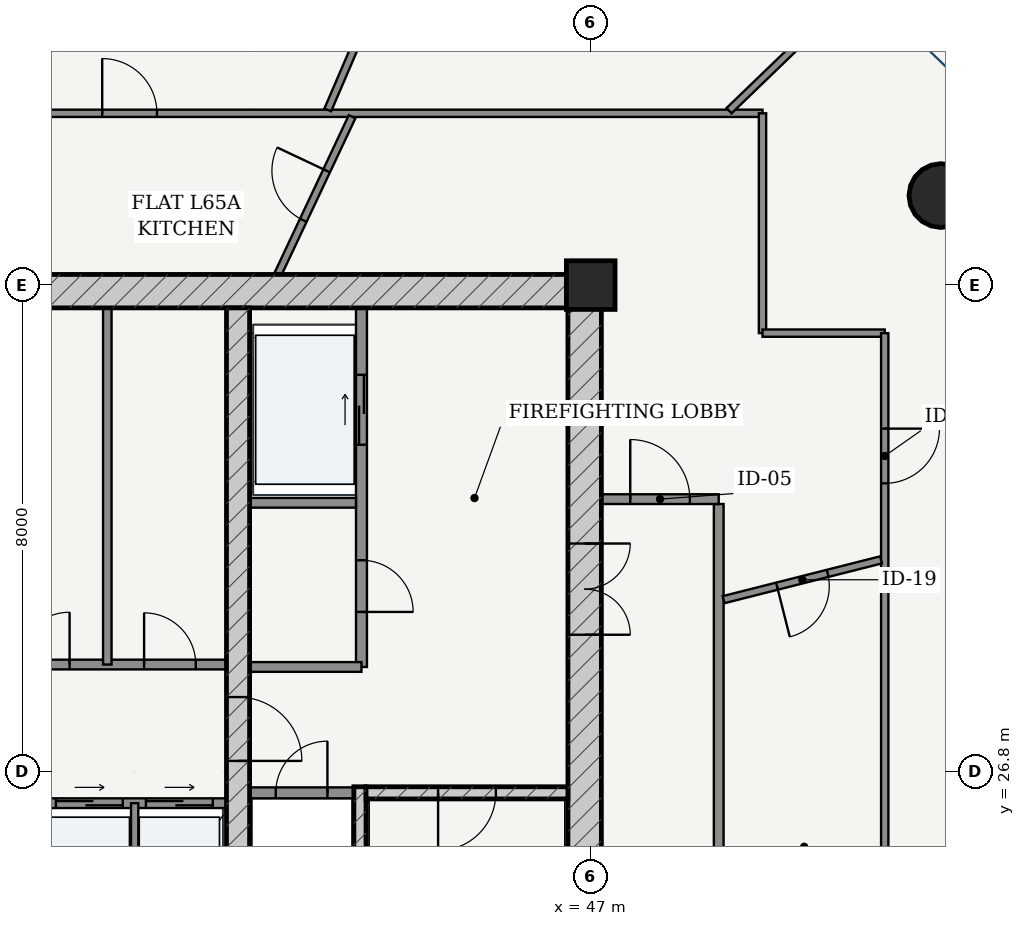
"""IFC4 building model, lengths in metres.
Left out: names, types, materials, properties, quantities, classifications, styles, units other than length and angle.
Written with IfcOpenShell. Run it as: python <this file> out.ifc"""

import sys

from ifc_helpers import new_model, si_unit, direction, frame, frame_2d, origin, origin_2d, place, context, subcontext, project, spatial, rectangle, hollow_circle, extrude, source, transform, mapped, element, fill, save


model = new_model("IFC4")
c1 = context("Model", 3, precision=1e-05, world=origin(), true_north=direction((-0.2419218956, 0.970295726276)))
c2 = subcontext(c1, "Body", "Model", "MODEL_VIEW")
j1 = project(units=[si_unit("LENGTHUNIT", "METRE"), si_unit("PLANEANGLEUNIT", "RADIAN")], contexts=[c1])
p1 = place(None, origin())
s1 = spatial("IfcSite", under=j1, at=p1, CompositionType="ELEMENT")
p2 = place(p1, origin())
s2 = spatial("IfcBuilding", under=s1, at=p2, CompositionType="ELEMENT")
p3 = place(p2, frame((0.0, 0.0, 248.2)))
s3 = spatial("IfcBuildingStorey", under=s2, at=p3, CompositionType="ELEMENT", Elevation=248.2)
p4 = place(p3, frame((47.0, 34.8, 0.0), z_axis=(0.0, 0.0, 1.0), x_axis=(1.0, 0.0, 0.0)))
e1 = element("IfcColumn", 1, at=p4, inside=s3, PredefinedType="COLUMN", context=c2, shape_type="SweptSolid", body=[
    extrude(rectangle(XDim=0.8, YDim=0.8, at=origin_2d()), origin(), (0.0, 0.0, 1.0), 3.75),
])
p5 = place(p3, frame((28.825, 34.7, 0.0), z_axis=(0.0, 0.0, 1.0), x_axis=(1.0, 0.0, 0.0)))
e2 = element("IfcWall", 2, at=p5, inside=s3, PredefinedType="SHEAR", context=c2, shape_type="SweptSolid", body=[
    extrude(rectangle(XDim=18.35, YDim=0.55, at=frame_2d((9.175, 0.0))), origin(), (0.0, 0.0, 1.0), 3.49),
])
p6 = place(p3, frame((46.9, 19.175, 0.0), z_axis=(0.0, 0.0, 1.0), x_axis=(0.0, 1.0, 0.0)))
e3 = element("IfcWall", 3, at=p6, inside=s3, PredefinedType="SHEAR", context=c2, shape_type="SweptSolid", body=[
    extrude(rectangle(XDim=15.25, YDim=0.55, at=frame_2d((7.625, 0.0))), origin(), (0.0, 0.0, 1.0), 3.49),
])
p7 = place(p6, frame((9.875, 0.0, 0.0)))
e4 = element("IfcOpeningElement", 4, at=p7, cuts=e3, PredefinedType="OPENING", context=c2, shape_type="SweptSolid", body=[
    extrude(rectangle(XDim=1.5, YDim=2.2, at=frame_2d((0.75, 1.1))), frame((0.0, 0.285, 0.0), z_axis=(0.0, -1.0, 0.0), x_axis=(1.0, 0.0, 0.0)), (0.0, 0.0, 1.0), 0.57),
])
p8 = place(p3, frame((43.205, 19.175, 0.0), z_axis=(0.0, 0.0, 1.0), x_axis=(0.0, 1.0, 0.0)))
e5 = element("IfcWall", 5, at=p8, inside=s3, PredefinedType="SOLIDWALL", context=c2, shape_type="SweptSolid", body=[
    extrude(rectangle(XDim=7.375, YDim=0.2, at=frame_2d((3.688, 0.0))), origin(), (0.0, 0.0, 1.0), 3.49),
])
p9 = place(p3, frame((43.305, 26.45, 0.0), z_axis=(0.0, 0.0, 1.0), x_axis=(1.0, 0.0, 0.0)))
e6 = element("IfcWall", 6, at=p9, inside=s3, PredefinedType="SOLIDWALL", context=c2, shape_type="SweptSolid", body=[
    extrude(rectangle(XDim=3.32, YDim=0.2, at=frame_2d((1.66, 0.0))), origin(), (0.0, 0.0, 1.0), 3.49),
])
p10 = place(p9, frame((1.185, 0.0, 0.0)))
e7 = element("IfcOpeningElement", 7, at=p10, cuts=e6, PredefinedType="OPENING", context=c2, shape_type="SweptSolid", body=[
    extrude(rectangle(XDim=0.95, YDim=2.15, at=frame_2d((0.475, 1.075))), frame((0.0, 0.11, 0.0), z_axis=(0.0, -1.0, 0.0), x_axis=(1.0, 0.0, 0.0)), (0.0, 0.0, 1.0), 0.22),
])
p11 = place(p3, frame((41.2, 19.175, 0.0), z_axis=(0.0, 0.0, 1.0), x_axis=(0.0, 1.0, 0.0)))
e8 = element("IfcWall", 8, at=p11, inside=s3, PredefinedType="SHEAR", context=c2, shape_type="SweptSolid", body=[
    extrude(rectangle(XDim=15.25, YDim=0.38, at=frame_2d((7.625, 0.0))), origin(), (0.0, 0.0, 1.0), 3.49),
])
p12 = place(p11, frame((7.8, 0.0, 0.0)))
e9 = element("IfcOpeningElement", 9, at=p12, cuts=e8, PredefinedType="OPENING", context=c2, shape_type="SweptSolid", body=[
    extrude(rectangle(XDim=1.05, YDim=2.15, at=frame_2d((0.525, 1.075))), frame((0.0, 0.2, 0.0), z_axis=(0.0, -1.0, 0.0), x_axis=(1.0, 0.0, 0.0)), (0.0, 0.0, 1.0), 0.4),
])
p13 = place(p3, frame((52.759, 36.272, 0.0), z_axis=(0.0, 0.0, 1.0), x_axis=(1.0, 0.0, 0.0)))
e10 = element("IfcColumn", 10, at=p13, inside=s3, PredefinedType="COLUMN", context=c2, shape_type="SweptSolid", body=[
    extrude(hollow_circle(Radius=0.525, WallThickness=0.035, at=origin_2d()), origin(), (0.0, 0.0, 1.0), 3.75),
])
p14 = place(p3, frame((41.39, 26.45, 0.0), z_axis=(0.0, 0.0, 1.0), x_axis=(1.0, 0.0, 0.0)))
e11 = element("IfcWall", 11, at=p14, inside=s3, PredefinedType="PARTITIONING", context=c2, shape_type="SweptSolid", body=[
    extrude(rectangle(XDim=1.71, YDim=0.18, at=frame_2d((0.855, 0.0))), origin(), (0.0, 0.0, 1.0), 3.49),
])
p15 = place(p14, frame((0.43, 0.0, 0.0)))
e12 = element("IfcOpeningElement", 12, at=p15, cuts=e11, PredefinedType="OPENING", context=c2, shape_type="SweptSolid", body=[
    extrude(rectangle(XDim=0.85, YDim=2.1, at=frame_2d((0.425, 1.05))), frame((0.0, 0.1, 0.0), z_axis=(0.0, -1.0, 0.0), x_axis=(1.0, 0.0, 0.0)), (0.0, 0.0, 1.0), 0.2),
])
p16 = place(p3, frame((43.23, 28.52, 0.0), z_axis=(0.0, 0.0, 1.0), x_axis=(0.0, 1.0, 0.0)))
e13 = element("IfcWall", 13, at=p16, inside=s3, PredefinedType="PARTITIONING", context=c2, shape_type="SweptSolid", body=[
    extrude(rectangle(XDim=5.905, YDim=0.18, at=frame_2d((2.953, 0.0))), origin(), (0.0, 0.0, 1.0), 3.49),
])
p17 = place(p16, frame((0.905, 0.0, 0.0)))
e14 = element("IfcOpeningElement", 14, at=p17, cuts=e13, PredefinedType="OPENING", context=c2, shape_type="SweptSolid", body=[
    extrude(rectangle(XDim=0.85, YDim=2.1, at=frame_2d((0.425, 1.05))), frame((0.0, 0.1, 0.0), z_axis=(0.0, -1.0, 0.0), x_axis=(1.0, 0.0, 0.0)), (0.0, 0.0, 1.0), 0.2),
])
p18 = place(p16, frame((3.655, 0.0, 0.0)))
e15 = element("IfcOpeningElement", 15, at=p18, cuts=e13, PredefinedType="OPENING", context=c2, shape_type="SweptSolid", body=[
    extrude(rectangle(XDim=1.15, YDim=2.2, at=frame_2d((0.575, 1.1))), frame((0.0, 0.1, 0.0), z_axis=(0.0, -1.0, 0.0), x_axis=(1.0, 0.0, 0.0)), (0.0, 0.0, 1.0), 0.2),
])
p19 = place(p3, frame((41.39, 31.22, 0.0), z_axis=(0.0, 0.0, 1.0), x_axis=(1.0, 0.0, 0.0)))
e16 = element("IfcWall", 16, at=p19, inside=s3, PredefinedType="PARTITIONING", context=c2, shape_type="SweptSolid", body=[
    extrude(rectangle(XDim=1.75, YDim=0.16, at=frame_2d((0.875, 0.0))), origin(), (0.0, 0.0, 1.0), 3.49),
])
p20 = place(p3, frame((41.39, 28.52, 0.0), z_axis=(0.0, 0.0, 1.0), x_axis=(1.0, 0.0, 0.0)))
e17 = element("IfcWall", 17, at=p20, inside=s3, PredefinedType="PARTITIONING", context=c2, shape_type="SweptSolid", body=[
    extrude(rectangle(XDim=1.84, YDim=0.16, at=frame_2d((0.92, 0.0))), origin(), (0.0, 0.0, 1.0), 3.49),
])
p21 = place(p3, frame((34.99, 28.56, 0.0), z_axis=(0.0, 0.0, 1.0), x_axis=(1.0, 0.0, 0.0)))
e18 = element("IfcWall", 18, at=p21, inside=s3, PredefinedType="PARTITIONING", context=c2, shape_type="SweptSolid", body=[
    extrude(rectangle(XDim=6.02, YDim=0.16, at=frame_2d((3.01, 0.0))), origin(), (0.0, 0.0, 1.0), 3.49),
])
p22 = place(p21, frame((0.505, 0.0, 0.0)))
e19 = element("IfcOpeningElement", 19, at=p22, cuts=e18, PredefinedType="OPENING", context=c2, shape_type="SweptSolid", body=[
    extrude(rectangle(XDim=0.85, YDim=2.1, at=frame_2d((0.425, 1.05))), frame((0.0, 0.09, 0.0), z_axis=(0.0, -1.0, 0.0), x_axis=(1.0, 0.0, 0.0)), (0.0, 0.0, 1.0), 0.18),
])
p23 = place(p21, frame((2.58, 0.0, 0.0)))
e20 = element("IfcOpeningElement", 20, at=p23, cuts=e18, PredefinedType="OPENING", context=c2, shape_type="SweptSolid", body=[
    extrude(rectangle(XDim=0.86, YDim=2.1, at=frame_2d((0.43, 1.05))), frame((0.0, 0.09, 0.0), z_axis=(0.0, -1.0, 0.0), x_axis=(1.0, 0.0, 0.0)), (0.0, 0.0, 1.0), 0.18),
])
p24 = place(p21, frame((4.665, 0.0, 0.0)))
e21 = element("IfcOpeningElement", 21, at=p24, cuts=e18, PredefinedType="OPENING", context=c2, shape_type="SweptSolid", body=[
    extrude(rectangle(XDim=0.85, YDim=2.1, at=frame_2d((0.425, 1.05))), frame((0.0, 0.09, 0.0), z_axis=(0.0, -1.0, 0.0), x_axis=(1.0, 0.0, 0.0)), (0.0, 0.0, 1.0), 0.18),
])
p25 = place(p3, frame((39.05, 28.56, 0.0), z_axis=(0.0, 0.0, 1.0), x_axis=(0.0, 1.0, 0.0)))
e22 = element("IfcWall", 22, at=p25, inside=s3, PredefinedType="PARTITIONING", context=c2, shape_type="SweptSolid", body=[
    extrude(rectangle(XDim=5.865, YDim=0.14, at=frame_2d((2.933, 0.0))), origin(), (0.0, 0.0, 1.0), 3.49),
])
p26 = place(p3, frame((34.99, 26.28, 0.0), z_axis=(0.0, 0.0, 1.0), x_axis=(1.0, 0.0, 0.0)))
e23 = element("IfcWall", 23, at=p26, inside=s3, PredefinedType="PARTITIONING", context=c2, shape_type="SweptSolid", body=[
    extrude(rectangle(XDim=6.02, YDim=0.16, at=frame_2d((3.01, 0.0))), origin(), (0.0, 0.0, 1.0), 3.49),
])
p27 = place(p26, frame((3.215, 0.0, 0.0)))
e24 = element("IfcOpeningElement", 24, at=p27, cuts=e23, PredefinedType="OPENING", context=c2, shape_type="SweptSolid", body=[
    extrude(rectangle(XDim=1.1, YDim=2.2, at=frame_2d((0.55, 1.1))), frame((0.0, 0.09, 0.0), z_axis=(0.0, -1.0, 0.0), x_axis=(1.0, 0.0, 0.0)), (0.0, 0.0, 1.0), 0.18),
])
p28 = place(p26, frame((4.695, 0.0, 0.0)))
e25 = element("IfcOpeningElement", 25, at=p28, cuts=e23, PredefinedType="OPENING", context=c2, shape_type="SweptSolid", body=[
    extrude(rectangle(XDim=1.1, YDim=2.2, at=frame_2d((0.55, 1.1))), frame((0.0, 0.09, 0.0), z_axis=(0.0, -1.0, 0.0), x_axis=(1.0, 0.0, 0.0)), (0.0, 0.0, 1.0), 0.18),
])
p29 = place(p3, frame((39.5, 23.72, 0.0), z_axis=(0.0, 0.0, 1.0), x_axis=(0.0, 1.0, 0.0)))
e26 = element("IfcWall", 26, at=p29, inside=s3, PredefinedType="PARTITIONING", context=c2, shape_type="SweptSolid", body=[
    extrude(rectangle(XDim=2.56, YDim=0.12, at=frame_2d((1.28, 0.0))), origin(), (0.0, 0.0, 1.0), 3.49),
])
p30 = place(p3, frame((49.105, 17.275, 0.0), z_axis=(0.0, 0.0, 1.0), x_axis=(0.0, 1.0, 0.0)))
e27 = element("IfcWall", 27, at=p30, inside=s3, PredefinedType="PARTITIONING", context=c2, shape_type="SweptSolid", body=[
    extrude(rectangle(XDim=13.925, YDim=0.16, at=frame_2d((6.962, 0.0))), origin(), (0.0, 0.0, 1.0), 3.015),
])
p31 = place(p3, frame((47.175, 31.28, 0.0), z_axis=(0.0, 0.0, 1.0), x_axis=(1.0, 0.0, 0.0)))
e28 = element("IfcWall", 28, at=p31, inside=s3, PredefinedType="PARTITIONING", context=c2, shape_type="SweptSolid", body=[
    extrude(rectangle(XDim=1.93, YDim=0.16, at=frame_2d((0.965, 0.0))), origin(), (0.0, 0.0, 1.0), 3.49),
])
p32 = place(p31, frame((0.475, 0.0, 0.0)))
e29 = element("IfcOpeningElement", 29, at=p32, cuts=e28, PredefinedType="OPENING", context=c2, shape_type="SweptSolid", body=[
    extrude(rectangle(XDim=0.98, YDim=2.2, at=frame_2d((0.49, 1.1))), frame((0.0, 0.09, 0.0), z_axis=(0.0, -1.0, 0.0), x_axis=(1.0, 0.0, 0.0)), (0.0, 0.0, 1.0), 0.18),
])
p33 = place(p3, frame((26.175, 37.625, 0.0), z_axis=(0.0, 0.0, 1.0), x_axis=(1.0, 0.0, 0.0)))
e30 = element("IfcWall", 30, at=p33, inside=s3, PredefinedType="PARTITIONING", context=c2, shape_type="SweptSolid", body=[
    extrude(rectangle(XDim=23.65, YDim=0.12, at=frame_2d((11.825, 0.0))), origin(), (0.0, 0.0, 1.0), 3.015),
])
p34 = place(p33, frame((12.791, 0.0, 0.0)))
e31 = element("IfcOpeningElement", 31, at=p34, cuts=e30, PredefinedType="OPENING", context=c2, shape_type="SweptSolid", body=[
    extrude(rectangle(XDim=0.9, YDim=2.15, at=frame_2d((0.45, 1.075))), frame((0.0, 0.07, 0.0), z_axis=(0.0, -1.0, 0.0), x_axis=(1.0, 0.0, 0.0)), (0.0, 0.0, 1.0), 0.14),
])
p35 = place(p33, frame((6.48, 0.0, 0.0)))
e32 = element("IfcOpeningElement", 32, at=p35, cuts=e30, PredefinedType="OPENING", context=c2, shape_type="SweptSolid", body=[
    extrude(rectangle(XDim=0.9, YDim=2.15, at=frame_2d((0.45, 1.075))), frame((0.0, 0.07, 0.0), z_axis=(0.0, -1.0, 0.0), x_axis=(1.0, 0.0, 0.0)), (0.0, 0.0, 1.0), 0.14),
])
p36 = place(p33, frame((1.831, 0.0, 0.0)))
e33 = element("IfcOpeningElement", 33, at=p36, cuts=e30, PredefinedType="OPENING", context=c2, shape_type="SweptSolid", body=[
    extrude(rectangle(XDim=0.9, YDim=2.15, at=frame_2d((0.45, 1.075))), frame((0.0, 0.07, 0.0), z_axis=(0.0, -1.0, 0.0), x_axis=(1.0, 0.0, 0.0)), (0.0, 0.0, 1.0), 0.14),
])
p37 = place(p3, frame((49.825, 37.625, 0.0), z_axis=(0.0, 0.0, 1.0), x_axis=(0.0, -1.0, 0.0)))
e34 = element("IfcWall", 34, at=p37, inside=s3, PredefinedType="PARTITIONING", context=c2, shape_type="SweptSolid", body=[
    extrude(rectangle(XDim=3.615, YDim=0.12, at=frame_2d((1.808, 0.0))), origin(), (0.0, 0.0, 1.0), 3.015),
])
p38 = place(p3, frame((49.825, 34.01, 0.0), z_axis=(0.0, 0.0, 1.0), x_axis=(1.0, 0.0, 0.0)))
e35 = element("IfcWall", 35, at=p38, inside=s3, PredefinedType="PARTITIONING", context=c2, shape_type="SweptSolid", body=[
    extrude(rectangle(XDim=2.01, YDim=0.12, at=frame_2d((1.005, 0.0))), origin(), (0.0, 0.0, 1.0), 3.209),
])
p39 = place(p3, frame((51.835, 34.01, 0.0), z_axis=(0.0, 0.0, 1.0), x_axis=(0.0, -1.0, 0.0)))
e36 = element("IfcWall", 36, at=p39, inside=s3, PredefinedType="PARTITIONING", context=c2, shape_type="SweptSolid", body=[
    extrude(rectangle(XDim=12.632, YDim=0.12, at=frame_2d((6.316, 0.0))), origin(), (0.0, 0.0, 1.0), 3.015),
])
p40 = place(p39, frame((1.57, 0.0, 0.0)))
e37 = element("IfcOpeningElement", 37, at=p40, cuts=e36, PredefinedType="OPENING", context=c2, shape_type="SweptSolid", body=[
    extrude(rectangle(XDim=0.9, YDim=2.15, at=frame_2d((0.45, 1.075))), frame((0.0, 0.07, 0.0), z_axis=(0.0, -1.0, 0.0), x_axis=(1.0, 0.0, 0.0)), (0.0, 0.0, 1.0), 0.14),
])
p41 = place(p3, frame((49.275, 37.668, 0.0), z_axis=(0.0, 0.0, 1.0), x_axis=(0.719954096891, 0.694021684366, 0.0)))
e38 = element("IfcWall", 38, at=p41, inside=s3, PredefinedType="PARTITIONING", context=c2, shape_type="SweptSolid", body=[
    extrude(rectangle(XDim=3.333, YDim=0.12, at=frame_2d((1.667, 0.0))), origin(), (0.0, 0.0, 1.0), 3.121),
])
p42 = place(p3, frame((42.676, 37.682, 0.0), z_axis=(0.0, 0.0, 1.0), x_axis=(0.394777489933, 0.918776759307, 0.0)))
e39 = element("IfcWall", 39, at=p42, inside=s3, PredefinedType="PARTITIONING", context=c2, shape_type="SweptSolid", body=[
    extrude(rectangle(XDim=6.9, YDim=0.12, at=frame_2d((3.45, 0.0))), origin(), (0.0, 0.0, 1.0), 3.121),
])
p43 = place(p42, frame((3.0, 0.0, 0.0)))
e40 = element("IfcOpeningElement", 40, at=p43, cuts=e39, PredefinedType="OPENING", context=c2, shape_type="SweptSolid", body=[
    extrude(rectangle(XDim=0.9, YDim=2.15, at=frame_2d((0.45, 1.075))), frame((0.0, 0.07, 0.0), z_axis=(0.0, -1.0, 0.0), x_axis=(1.0, 0.0, 0.0)), (0.0, 0.0, 1.0), 0.14),
])
p44 = place(p3, frame((49.185, 29.627, 0.0), z_axis=(0.0, 0.0, 1.0), x_axis=(0.969515658159, 0.2450293627, 0.0)))
e41 = element("IfcWall", 41, at=p44, inside=s3, PredefinedType="PARTITIONING", context=c2, shape_type="SweptSolid", body=[
    extrude(rectangle(XDim=2.671, YDim=0.12, at=frame_2d((1.336, 0.0))), origin(), (0.0, 0.0, 1.0), 3.209),
])
p45 = place(p44, frame((0.906, 0.0, 0.0)))
e42 = element("IfcOpeningElement", 42, at=p45, cuts=e41, PredefinedType="OPENING", context=c2, shape_type="SweptSolid", body=[
    extrude(rectangle(XDim=0.86, YDim=2.15, at=frame_2d((0.43, 1.075))), frame((0.0, 0.07, 0.0), z_axis=(0.0, -1.0, 0.0), x_axis=(1.0, 0.0, 0.0)), (0.0, 0.0, 1.0), 0.14),
])
p46 = place(p3, frame((41.854, 34.977, 0.0), z_axis=(0.0, 0.0, 1.0), x_axis=(0.42640827804, 0.904530806783, 0.0)))
e43 = element("IfcWall", 43, at=p46, inside=s3, PredefinedType="PARTITIONING", context=c2, shape_type="SweptSolid", body=[
    extrude(rectangle(XDim=2.866, YDim=0.12, at=frame_2d((1.433, 0.0))), origin(), (0.0, 0.0, 1.0), 3.49),
])
p47 = place(p46, frame((0.983, 0.0, 0.0)))
e44 = element("IfcOpeningElement", 44, at=p47, cuts=e43, PredefinedType="OPENING", context=c2, shape_type="SweptSolid", body=[
    extrude(rectangle(XDim=0.9, YDim=2.15, at=frame_2d((0.45, 1.075))), frame((0.0, 0.07, 0.0), z_axis=(0.0, -1.0, 0.0), x_axis=(1.0, 0.0, 0.0)), (0.0, 0.0, 1.0), 0.14),
])
m1 = source(origin(), c2, "Body", "SweptSolid", [
    extrude(rectangle(XDim=1.5, YDim=2.2, at=frame_2d((0.75, 1.1))), frame((0.0, 0.025, 0.0), z_axis=(0.0, -1.0, 0.0), x_axis=(1.0, 0.0, 0.0)), (0.0, 0.0, 1.0), 0.05),
])
p48 = place(p7, frame((1.5, 0.0, 0.0), z_axis=(0.0, 0.0, 1.0), x_axis=(-1.0, 0.0, 0.0)))
e45 = element("IfcDoor", 45, at=p48, inside=s3, OperationType="DOUBLE_DOOR_SINGLE_SWING", PredefinedType="DOOR", context=c2, shape_type="MappedRepresentation", body=[
    mapped(m1, transform((0.0, 0.0, 0.0), scale=1.0)),
])
fill(e4, e45)
m2 = source(origin(), c2, "Body", "SweptSolid", [
    extrude(rectangle(XDim=1.05, YDim=2.15, at=frame_2d((0.525, 1.075))), frame((0.0, 0.025, 0.0), z_axis=(0.0, -1.0, 0.0), x_axis=(1.0, 0.0, 0.0)), (0.0, 0.0, 1.0), 0.05),
])
p49 = place(p12, frame((1.05, 0.0, 0.0), z_axis=(0.0, 0.0, 1.0), x_axis=(-1.0, 0.0, 0.0)))
e46 = element("IfcDoor", 46, at=p49, inside=s3, OperationType="SINGLE_SWING_RIGHT", PredefinedType="DOOR", context=c2, shape_type="MappedRepresentation", body=[
    mapped(m2, transform((0.0, 0.0, 0.0), scale=1.0)),
])
fill(e9, e46)
m3 = source(origin(), c2, "Body", "SweptSolid", [
    extrude(rectangle(XDim=0.95, YDim=2.15, at=frame_2d((0.475, 1.075))), frame((0.0, 0.025, 0.0), z_axis=(0.0, -1.0, 0.0), x_axis=(1.0, 0.0, 0.0)), (0.0, 0.0, 1.0), 0.05),
])
p50 = place(p10, frame((0.95, 0.0, 0.0), z_axis=(0.0, 0.0, 1.0), x_axis=(-1.0, 0.0, 0.0)))
e47 = element("IfcDoor", 47, at=p50, inside=s3, OperationType="SINGLE_SWING_RIGHT", PredefinedType="DOOR", context=c2, shape_type="MappedRepresentation", body=[
    mapped(m3, transform((0.0, 0.0, 0.0), scale=1.0)),
])
fill(e7, e47)
m4 = source(origin(), c2, "Body", "SweptSolid", [
    extrude(rectangle(XDim=0.85, YDim=2.1, at=frame_2d((0.425, 1.05))), frame((0.0, 0.025, 0.0), z_axis=(0.0, -1.0, 0.0), x_axis=(1.0, 0.0, 0.0)), (0.0, 0.0, 1.0), 0.05),
])
p51 = place(p15, origin())
e48 = element("IfcDoor", 48, at=p51, inside=s3, OperationType="SINGLE_SWING_RIGHT", PredefinedType="DOOR", context=c2, shape_type="MappedRepresentation", body=[
    mapped(m4, transform((0.0, 0.0, 0.0), scale=1.0)),
])
fill(e12, e48)
p52 = place(p17, frame((0.85, 0.0, 0.0), z_axis=(0.0, 0.0, 1.0), x_axis=(-1.0, 0.0, 0.0)))
e49 = element("IfcDoor", 49, at=p52, inside=s3, OperationType="SINGLE_SWING_RIGHT", PredefinedType="DOOR", context=c2, shape_type="MappedRepresentation", body=[
    mapped(m4, transform((0.0, 0.0, 0.0), scale=1.0)),
])
fill(e14, e49)
m5 = source(origin(), c2, "Body", "SweptSolid", [
    extrude(rectangle(XDim=0.86, YDim=2.1, at=frame_2d((0.43, 1.05))), frame((0.0, 0.025, 0.0), z_axis=(0.0, -1.0, 0.0), x_axis=(1.0, 0.0, 0.0)), (0.0, 0.0, 1.0), 0.05),
])
p53 = place(p23, origin())
e50 = element("IfcDoor", 50, at=p53, inside=s3, OperationType="SINGLE_SWING_RIGHT", PredefinedType="DOOR", context=c2, shape_type="MappedRepresentation", body=[
    mapped(m5, transform((0.0, 0.0, 0.0), scale=1.0)),
])
fill(e20, e50)
p54 = place(p24, origin())
e51 = element("IfcDoor", 51, at=p54, inside=s3, OperationType="SINGLE_SWING_LEFT", PredefinedType="DOOR", context=c2, shape_type="MappedRepresentation", body=[
    mapped(m4, transform((0.0, 0.0, 0.0), scale=1.0)),
])
fill(e21, e51)
m6 = source(origin(), c2, "Body", "SweptSolid", [
    extrude(rectangle(XDim=1.15, YDim=2.2, at=frame_2d((0.575, 1.1))), frame((0.0, 0.025, 0.0), z_axis=(0.0, -1.0, 0.0), x_axis=(1.0, 0.0, 0.0)), (0.0, 0.0, 1.0), 0.05),
])
p55 = place(p18, origin())
e52 = element("IfcDoor", 52, at=p55, inside=s3, OperationType="DOUBLE_DOOR_SLIDING", PredefinedType="DOOR", context=c2, shape_type="MappedRepresentation", body=[
    mapped(m6, transform((0.0, 0.0, 0.0), scale=1.0)),
])
fill(e15, e52)
m7 = source(origin(), c2, "Body", "SweptSolid", [
    extrude(rectangle(XDim=1.1, YDim=2.2, at=frame_2d((0.55, 1.1))), frame((0.0, 0.025, 0.0), z_axis=(0.0, -1.0, 0.0), x_axis=(1.0, 0.0, 0.0)), (0.0, 0.0, 1.0), 0.05),
])
p56 = place(p27, origin())
e53 = element("IfcDoor", 53, at=p56, inside=s3, OperationType="DOUBLE_DOOR_SLIDING", PredefinedType="DOOR", context=c2, shape_type="MappedRepresentation", body=[
    mapped(m7, transform((0.0, 0.0, 0.0), scale=1.0)),
])
fill(e24, e53)
p57 = place(p28, origin())
e54 = element("IfcDoor", 54, at=p57, inside=s3, OperationType="DOUBLE_DOOR_SLIDING", PredefinedType="DOOR", context=c2, shape_type="MappedRepresentation", body=[
    mapped(m7, transform((0.0, 0.0, 0.0), scale=1.0)),
])
fill(e25, e54)
m8 = source(origin(), c2, "Body", "SweptSolid", [
    extrude(rectangle(XDim=0.98, YDim=2.2, at=frame_2d((0.49, 1.1))), frame((0.0, 0.025, 0.0), z_axis=(0.0, -1.0, 0.0), x_axis=(1.0, 0.0, 0.0)), (0.0, 0.0, 1.0), 0.05),
])
p58 = place(p32, origin())
e55 = element("IfcDoor", 55, at=p58, inside=s3, OperationType="SINGLE_SWING_LEFT", PredefinedType="DOOR", context=c2, shape_type="MappedRepresentation", body=[
    mapped(m8, transform((0.0, 0.0, 0.0), scale=1.0)),
])
fill(e29, e55)
m9 = source(origin(), c2, "Body", "SweptSolid", [
    extrude(rectangle(XDim=0.86, YDim=2.15, at=frame_2d((0.43, 1.075))), frame((0.0, 0.025, 0.0), z_axis=(0.0, -1.0, 0.0), x_axis=(1.0, 0.0, 0.0)), (0.0, 0.0, 1.0), 0.05),
])
p59 = place(p45, frame((0.86, 0.0, 0.0), z_axis=(0.0, 0.0, 1.0), x_axis=(-1.0, 0.0, 0.0)))
e56 = element("IfcDoor", 56, at=p59, inside=s3, OperationType="SINGLE_SWING_RIGHT", PredefinedType="DOOR", context=c2, shape_type="MappedRepresentation", body=[
    mapped(m9, transform((0.0, 0.0, 0.0), scale=1.0)),
])
fill(e42, e56)
m10 = source(origin(), c2, "Body", "SweptSolid", [
    extrude(rectangle(XDim=0.9, YDim=2.15, at=frame_2d((0.45, 1.075))), frame((0.0, 0.025, 0.0), z_axis=(0.0, -1.0, 0.0), x_axis=(1.0, 0.0, 0.0)), (0.0, 0.0, 1.0), 0.05),
])
p60 = place(p40, origin())
e57 = element("IfcDoor", 57, at=p60, inside=s3, OperationType="SINGLE_SWING_LEFT", PredefinedType="DOOR", context=c2, shape_type="MappedRepresentation", body=[
    mapped(m10, transform((0.0, 0.0, 0.0), scale=1.0)),
])
fill(e37, e57)
p61 = place(p47, origin())
e58 = element("IfcDoor", 58, at=p61, inside=s3, OperationType="SINGLE_SWING_RIGHT", PredefinedType="DOOR", context=c2, shape_type="MappedRepresentation", body=[
    mapped(m10, transform((0.0, 0.0, 0.0), scale=1.0)),
])
fill(e44, e58)
p62 = place(p34, origin())
e59 = element("IfcDoor", 59, at=p62, inside=s3, OperationType="SINGLE_SWING_LEFT", PredefinedType="DOOR", context=c2, shape_type="MappedRepresentation", body=[
    mapped(m10, transform((0.0, 0.0, 0.0), scale=1.0)),
])
fill(e31, e59)
save(model, sys.argv[1])
